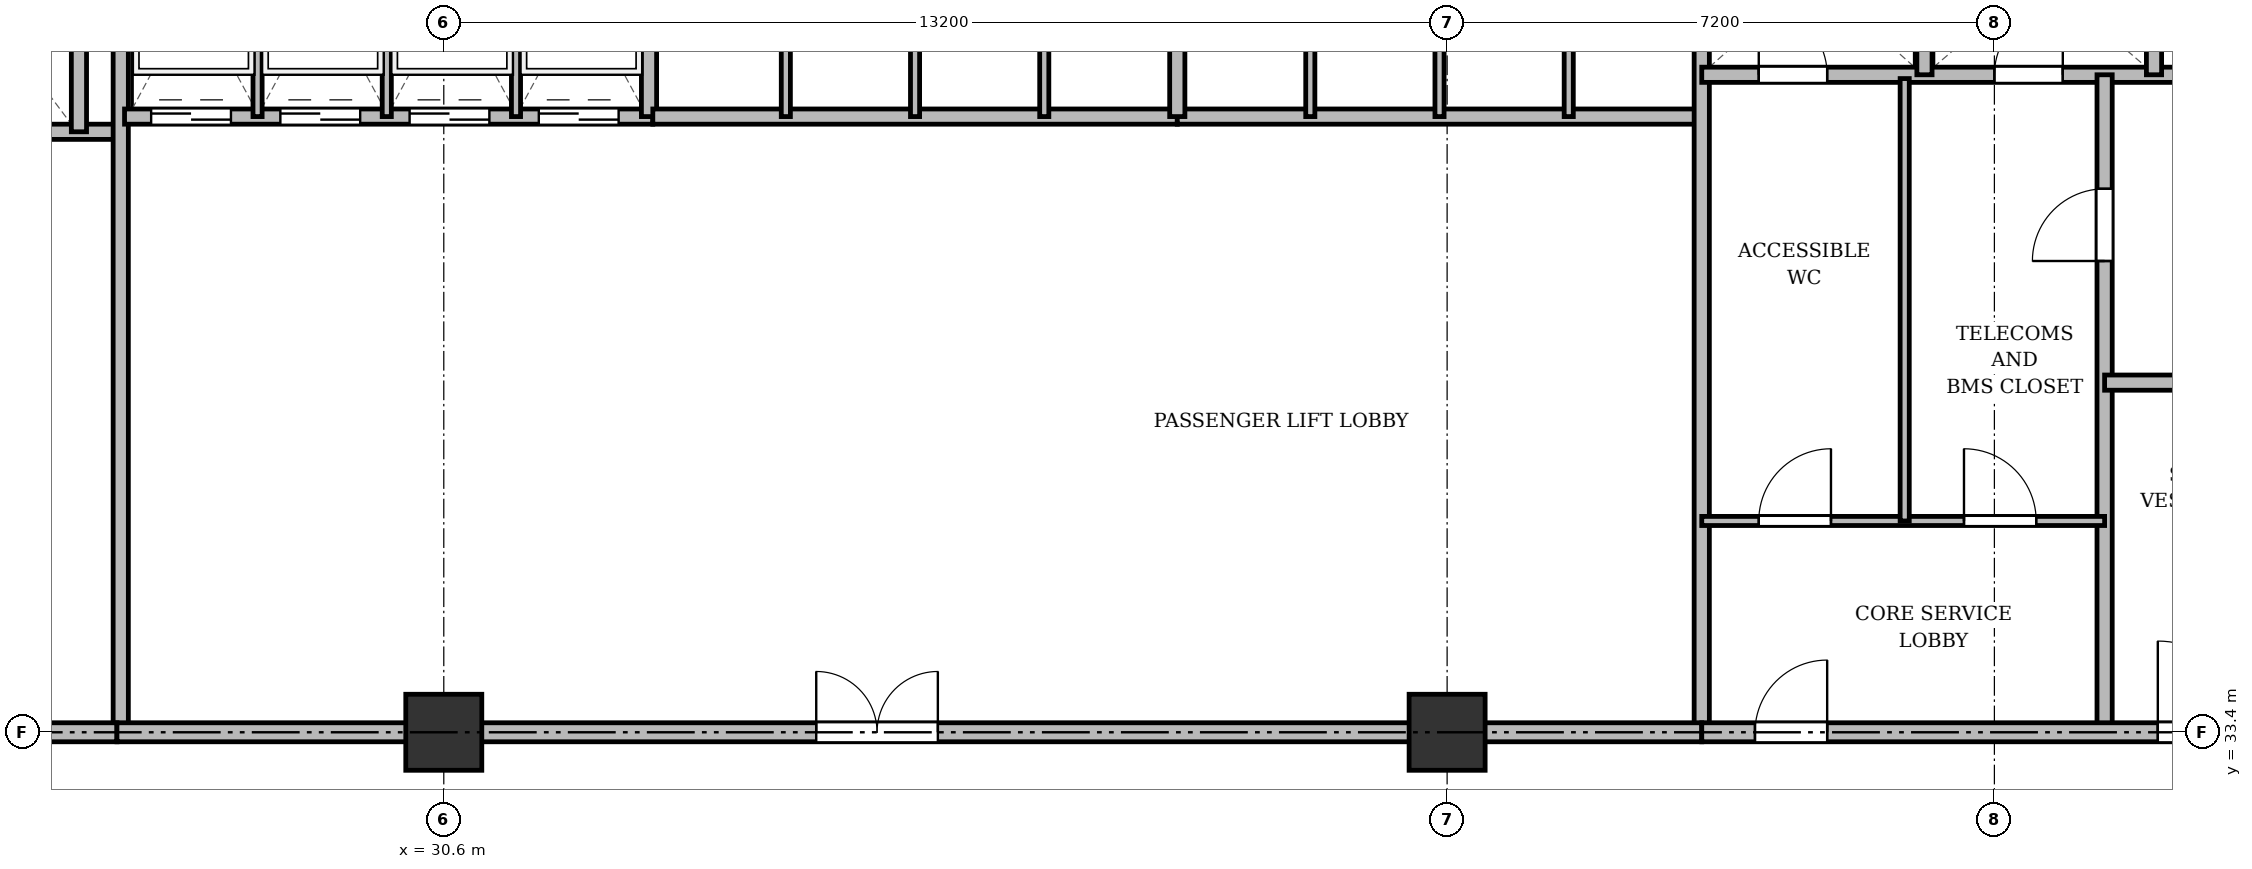
"""IFC4 building model, lengths in metres.
Left out: names, types, materials, properties, quantities, classifications, styles, units other than length and angle.
Written with IfcOpenShell. Run it as: python <this file> out.ifc"""

import sys

from ifc_helpers import new_model, si_unit, direction, frame, frame_2d, origin, origin_2d, place, context, subcontext, project, spatial, rectangle, extrude, source, transform, mapped, element, fill, save


model = new_model("IFC4")
c1 = context("Model", 3, precision=1e-05, world=origin(), true_north=direction((0.0, 1.0)))
c2 = subcontext(c1, "Body", "Model", "MODEL_VIEW")
j1 = project(units=[si_unit("LENGTHUNIT", "METRE"), si_unit("PLANEANGLEUNIT", "RADIAN")], contexts=[c1])
p1 = place(None, origin())
s1 = spatial("IfcSite", under=j1, at=p1, CompositionType="ELEMENT")
p2 = place(p1, origin())
s2 = spatial("IfcBuilding", under=s1, at=p2, CompositionType="ELEMENT")
p3 = place(p2, frame((0.0, 0.0, 14.2)))
s3 = spatial("IfcBuildingStorey", under=s2, at=p3, CompositionType="ELEMENT", Elevation=14.2)
m1 = source(origin(), c2, "Body", "SweptSolid", [
    extrude(rectangle(XDim=1.0, YDim=1.0, at=origin_2d()), origin(), (0.0, 0.0, 1.0), 4.5),
])
for number, where, z_axis, x_axis in (
    (1, (30.6, 33.4, 0.0), (0.0, 0.0, 1.0), (1.0, 0.0, 0.0)),
    (2, (43.8, 33.4, 0.0), (0.0, 0.0, 1.0), (1.0, 0.0, 0.0)),
):
    element("IfcColumn", number, at=place(p3, frame(where, z_axis=z_axis, x_axis=x_axis)), inside=s3, PredefinedType="COLUMN", context=c2, shape_type="MappedRepresentation", body=[
        mapped(m1, transform((0.0, 0.0, 0.0), x_axis=(1.0, 0.0, 0.0), y_axis=(0.0, 1.0, 0.0), z_axis=(0.0, 0.0, 1.0), scale=1.0)),
    ])
p4 = place(p3, frame((19.55, 41.3, 0.0), z_axis=(0.0, 0.0, 1.0), x_axis=(1.0, 0.0, 0.0)))
e3 = element("IfcWall", 3, at=p4, inside=s3, PredefinedType="SOLIDWALL", context=c2, shape_type="SweptSolid", body=[
    extrude(rectangle(XDim=6.75, YDim=0.2, at=frame_2d((3.375, 0.0))), origin(), (0.0, 0.0, 1.0), 4.15),
])
p5 = place(p4, frame((1.7, 0.0, 0.0)))
e4 = element("IfcOpeningElement", 4, at=p5, cuts=e3, PredefinedType="OPENING", context=c2, shape_type="SweptSolid", body=[
    extrude(rectangle(XDim=1.1, YDim=2.15, at=frame_2d((0.55, 1.075))), frame((0.0, 0.11, 0.0), z_axis=(0.0, -1.0, 0.0), x_axis=(1.0, 0.0, 0.0)), (0.0, 0.0, 1.0), 0.22),
])
p6 = place(p4, frame((4.4, 0.0, 0.0)))
e5 = element("IfcOpeningElement", 5, at=p6, cuts=e3, PredefinedType="OPENING", context=c2, shape_type="SweptSolid", body=[
    extrude(rectangle(XDim=1.1, YDim=2.15, at=frame_2d((0.55, 1.075))), frame((0.0, 0.11, 0.0), z_axis=(0.0, -1.0, 0.0), x_axis=(1.0, 0.0, 0.0)), (0.0, 0.0, 1.0), 0.22),
])
p7 = place(p3, frame((25.8, 41.3, 0.0), z_axis=(0.0, 0.0, 1.0), x_axis=(0.0, 1.0, 0.0)))
e6 = element("IfcWall", 6, at=p7, inside=s3, PredefinedType="SOLIDWALL", context=c2, shape_type="SweptSolid", body=[
    extrude(rectangle(XDim=3.4, YDim=0.2, at=frame_2d((1.7, 0.0))), origin(), (0.0, 0.0, 1.0), 4.15),
])
p8 = place(p3, frame((26.35, 33.4, 0.0), z_axis=(0.0, 0.0, 1.0), x_axis=(0.0, 1.0, 0.0)))
e7 = element("IfcWall", 7, at=p8, inside=s3, PredefinedType="SOLIDWALL", context=c2, shape_type="SweptSolid", body=[
    extrude(rectangle(XDim=11.3, YDim=0.2, at=frame_2d((5.65, 0.0))), origin(), (0.0, 0.0, 1.0), 3.05),
])
p9 = place(p3, frame((19.5, 33.4, 0.0), z_axis=(0.0, 0.0, 1.0), x_axis=(1.0, 0.0, 0.0)))
e8 = element("IfcWall", 8, at=p9, inside=s3, PredefinedType="PARTITIONING", context=c2, shape_type="SweptSolid", body=[
    extrude(rectangle(XDim=6.8, YDim=0.25, at=frame_2d((3.4, 0.0))), origin(), (0.0, 0.0, 1.0), 3.05),
])
p10 = place(p9, frame((0.75, 0.0, 0.0)))
e9 = element("IfcOpeningElement", 9, at=p10, cuts=e8, PredefinedType="OPENING", context=c2, shape_type="SweptSolid", body=[
    extrude(rectangle(XDim=1.6, YDim=2.2, at=frame_2d((0.8, 1.1))), frame((0.0, 0.135, 0.0), z_axis=(0.0, -1.0, 0.0), x_axis=(1.0, 0.0, 0.0)), (0.0, 0.0, 1.0), 0.27),
])
p11 = place(p3, frame((26.4, 41.5, 0.0), z_axis=(0.0, 0.0, 1.0), x_axis=(1.0, 0.0, 0.0)))
e10 = element("IfcWall", 10, at=p11, inside=s3, PredefinedType="SOLIDWALL", context=c2, shape_type="SweptSolid", body=[
    extrude(rectangle(XDim=6.95, YDim=0.2, at=frame_2d((3.475, 0.0))), origin(), (0.0, 0.0, 1.0), 4.15),
])
p12 = place(p11, frame((0.35, 0.0, 0.0)))
e11 = element("IfcOpeningElement", 11, at=p12, cuts=e10, PredefinedType="OPENING", context=c2, shape_type="SweptSolid", body=[
    extrude(rectangle(XDim=1.05, YDim=2.15, at=frame_2d((0.525, 1.075))), frame((0.0, 0.11, 0.0), z_axis=(0.0, -1.0, 0.0), x_axis=(1.0, 0.0, 0.0)), (0.0, 0.0, 1.0), 0.22),
])
p13 = place(p11, frame((2.05, 0.0, 0.0)))
e12 = element("IfcOpeningElement", 12, at=p13, cuts=e10, PredefinedType="OPENING", context=c2, shape_type="SweptSolid", body=[
    extrude(rectangle(XDim=1.05, YDim=2.15, at=frame_2d((0.525, 1.075))), frame((0.0, 0.11, 0.0), z_axis=(0.0, -1.0, 0.0), x_axis=(1.0, 0.0, 0.0)), (0.0, 0.0, 1.0), 0.22),
])
p14 = place(p11, frame((3.75, 0.0, 0.0)))
e13 = element("IfcOpeningElement", 13, at=p14, cuts=e10, PredefinedType="OPENING", context=c2, shape_type="SweptSolid", body=[
    extrude(rectangle(XDim=1.05, YDim=2.15, at=frame_2d((0.525, 1.075))), frame((0.0, 0.11, 0.0), z_axis=(0.0, -1.0, 0.0), x_axis=(1.0, 0.0, 0.0)), (0.0, 0.0, 1.0), 0.22),
])
p15 = place(p11, frame((5.45, 0.0, 0.0)))
e14 = element("IfcOpeningElement", 14, at=p15, cuts=e10, PredefinedType="OPENING", context=c2, shape_type="SweptSolid", body=[
    extrude(rectangle(XDim=1.05, YDim=2.15, at=frame_2d((0.525, 1.075))), frame((0.0, 0.11, 0.0), z_axis=(0.0, -1.0, 0.0), x_axis=(1.0, 0.0, 0.0)), (0.0, 0.0, 1.0), 0.22),
])
p16 = place(p3, frame((33.3, 41.5, 0.0), z_axis=(0.0, 0.0, 1.0), x_axis=(0.0, 1.0, 0.0)))
e15 = element("IfcWall", 15, at=p16, inside=s3, PredefinedType="SOLIDWALL", context=c2, shape_type="SweptSolid", body=[
    extrude(rectangle(XDim=3.2, YDim=0.2, at=frame_2d((1.6, 0.0))), origin(), (0.0, 0.0, 1.0), 4.15),
])
for number, where, z_axis, x_axis in (
    (16, (28.15, 41.5, 0.0), (0.0, 0.0, 1.0), (0.0, 1.0, 0.0)),
    (17, (29.85, 41.5, 0.0), (0.0, 0.0, 1.0), (0.0, 1.0, 0.0)),
    (18, (31.55, 41.5, 0.0), (0.0, 0.0, 1.0), (0.0, 1.0, 0.0)),
):
    element("IfcWall", number, at=place(p3, frame(where, z_axis=z_axis, x_axis=x_axis)), inside=s3, PredefinedType="PARTITIONING", context=c2, shape_type="SweptSolid", body=[
        extrude(rectangle(XDim=3.2, YDim=0.12, at=frame_2d((1.6, 0.0))), origin(), (0.0, 0.0, 1.0), 4.15),
    ])
p17 = place(p3, frame((33.35, 41.5, 0.0), z_axis=(0.0, 0.0, 1.0), x_axis=(1.0, 0.0, 0.0)))
e19 = element("IfcWall", 19, at=p17, inside=s3, PredefinedType="SOLIDWALL", context=c2, shape_type="SweptSolid", body=[
    extrude(rectangle(XDim=6.9, YDim=0.2, at=frame_2d((3.45, 0.0))), origin(), (0.0, 0.0, 1.0), 4.15),
])
for number, where, z_axis, x_axis in (
    (20, (35.1, 41.5, 0.0), (0.0, 0.0, 1.0), (0.0, 1.0, 0.0)),
    (21, (36.8, 41.5, 0.0), (0.0, 0.0, 1.0), (0.0, 1.0, 0.0)),
    (22, (38.5, 41.5, 0.0), (0.0, 0.0, 1.0), (0.0, 1.0, 0.0)),
):
    element("IfcWall", number, at=place(p3, frame(where, z_axis=z_axis, x_axis=x_axis)), inside=s3, PredefinedType="PARTITIONING", context=c2, shape_type="SweptSolid", body=[
        extrude(rectangle(XDim=3.2, YDim=0.12, at=frame_2d((1.6, 0.0))), origin(), (0.0, 0.0, 1.0), 4.15),
    ])
p18 = place(p3, frame((40.25, 41.5, 0.0), z_axis=(0.0, 0.0, 1.0), x_axis=(1.0, 0.0, 0.0)))
e23 = element("IfcWall", 23, at=p18, inside=s3, PredefinedType="SOLIDWALL", context=c2, shape_type="SweptSolid", body=[
    extrude(rectangle(XDim=6.9, YDim=0.2, at=frame_2d((3.45, 0.0))), origin(), (0.0, 0.0, 1.0), 3.35),
])
p19 = place(p3, frame((40.25, 41.5, 0.0), z_axis=(0.0, 0.0, 1.0), x_axis=(0.0, 1.0, 0.0)))
e24 = element("IfcWall", 24, at=p19, inside=s3, PredefinedType="SOLIDWALL", context=c2, shape_type="SweptSolid", body=[
    extrude(rectangle(XDim=3.2, YDim=0.2, at=frame_2d((1.6, 0.0))), origin(), (0.0, 0.0, 1.0), 4.15),
])
p20 = place(p3, frame((42.0, 41.5, 0.0), z_axis=(0.0, 0.0, 1.0), x_axis=(0.0, 1.0, 0.0)))
e25 = element("IfcWall", 25, at=p20, inside=s3, PredefinedType="PARTITIONING", context=c2, shape_type="SweptSolid", body=[
    extrude(rectangle(XDim=3.2, YDim=0.12, at=frame_2d((1.6, 0.0))), origin(), (0.0, 0.0, 1.0), 4.15),
])
p21 = place(p3, frame((43.7, 41.5, 0.0), z_axis=(0.0, 0.0, 1.0), x_axis=(0.0, 1.0, 0.0)))
e26 = element("IfcWall", 26, at=p21, inside=s3, PredefinedType="PARTITIONING", context=c2, shape_type="SweptSolid", body=[
    extrude(rectangle(XDim=3.2, YDim=0.12, at=frame_2d((1.6, 0.0))), origin(), (0.0, 0.0, 1.0), 3.35),
])
p22 = place(p3, frame((45.4, 41.5, 0.0), z_axis=(0.0, 0.0, 1.0), x_axis=(0.0, 1.0, 0.0)))
e27 = element("IfcWall", 27, at=p22, inside=s3, PredefinedType="PARTITIONING", context=c2, shape_type="SweptSolid", body=[
    extrude(rectangle(XDim=3.2, YDim=0.12, at=frame_2d((1.6, 0.0))), origin(), (0.0, 0.0, 1.0), 4.15),
])
p23 = place(p3, frame((47.15, 33.4, 0.0), z_axis=(0.0, 0.0, 1.0), x_axis=(0.0, 1.0, 0.0)))
e28 = element("IfcWall", 28, at=p23, inside=s3, PredefinedType="SOLIDWALL", context=c2, shape_type="SweptSolid", body=[
    extrude(rectangle(XDim=11.3, YDim=0.2, at=frame_2d((5.65, 0.0))), origin(), (0.0, 0.0, 1.0), 3.05),
])
p24 = place(p3, frame((26.3, 33.4, 0.0), z_axis=(0.0, 0.0, 1.0), x_axis=(1.0, 0.0, 0.0)))
e29 = element("IfcWall", 29, at=p24, inside=s3, PredefinedType="PARTITIONING", context=c2, shape_type="SweptSolid", body=[
    extrude(rectangle(XDim=20.85, YDim=0.25, at=frame_2d((10.425, 0.0))), origin(), (0.0, 0.0, 1.0), 3.05),
])
p25 = place(p24, frame((9.2, 0.0, 0.0)))
e30 = element("IfcOpeningElement", 30, at=p25, cuts=e29, PredefinedType="OPENING", context=c2, shape_type="SweptSolid", body=[
    extrude(rectangle(XDim=1.6, YDim=2.2, at=frame_2d((0.8, 1.1))), frame((0.0, 0.135, 0.0), z_axis=(0.0, -1.0, 0.0), x_axis=(1.0, 0.0, 0.0)), (0.0, 0.0, 1.0), 0.27),
])
p26 = place(p3, frame((47.15, 42.05, 0.0), z_axis=(0.0, 0.0, 1.0), x_axis=(1.0, 0.0, 0.0)))
e31 = element("IfcWall", 31, at=p26, inside=s3, PredefinedType="SOLIDWALL", context=c2, shape_type="SweptSolid", body=[
    extrude(rectangle(XDim=7.85, YDim=0.2, at=frame_2d((3.925, 0.0))), origin(), (0.0, 0.0, 1.0), 4.15),
])
p27 = place(p26, frame((0.75, 0.0, 0.0)))
e32 = element("IfcOpeningElement", 32, at=p27, cuts=e31, PredefinedType="OPENING", context=c2, shape_type="SweptSolid", body=[
    extrude(rectangle(XDim=0.9, YDim=2.1, at=frame_2d((0.45, 1.05))), frame((0.0, 0.11, 0.0), z_axis=(0.0, -1.0, 0.0), x_axis=(1.0, 0.0, 0.0)), (0.0, 0.0, 1.0), 0.22),
])
p28 = place(p26, frame((3.85, 0.0, 0.0)))
e33 = element("IfcOpeningElement", 33, at=p28, cuts=e31, PredefinedType="OPENING", context=c2, shape_type="SweptSolid", body=[
    extrude(rectangle(XDim=0.9, YDim=2.1, at=frame_2d((0.45, 1.05))), frame((0.0, 0.11, 0.0), z_axis=(0.0, -1.0, 0.0), x_axis=(1.0, 0.0, 0.0)), (0.0, 0.0, 1.0), 0.22),
])
for number, where, z_axis, x_axis in (
    (34, (50.08, 42.05, 0.0), (0.0, 0.0, 1.0), (0.0, 1.0, 0.0)),
    (35, (53.1, 42.05, 0.0), (0.0, 0.0, 1.0), (0.0, 1.0, 0.0)),
):
    element("IfcWall", number, at=place(p3, frame(where, z_axis=z_axis, x_axis=x_axis)), inside=s3, PredefinedType="SOLIDWALL", context=c2, shape_type="SweptSolid", body=[
        extrude(rectangle(XDim=2.65, YDim=0.2, at=frame_2d((1.325, 0.0))), origin(), (0.0, 0.0, 1.0), 4.15),
    ])
p29 = place(p3, frame((52.45, 33.4, 0.0), z_axis=(0.0, 0.0, 1.0), x_axis=(0.0, 1.0, 0.0)))
e36 = element("IfcWall", 36, at=p29, inside=s3, PredefinedType="PARTITIONING", context=c2, shape_type="SweptSolid", body=[
    extrude(rectangle(XDim=8.65, YDim=0.2, at=frame_2d((4.325, 0.0))), origin(), (0.0, 0.0, 1.0), 3.05),
])
p30 = place(p29, frame((6.2, 0.0, 0.0)))
e37 = element("IfcOpeningElement", 37, at=p30, cuts=e36, PredefinedType="OPENING", context=c2, shape_type="SweptSolid", body=[
    extrude(rectangle(XDim=0.95, YDim=2.15, at=frame_2d((0.475, 1.075))), frame((0.0, 0.11, 0.0), z_axis=(0.0, -1.0, 0.0), x_axis=(1.0, 0.0, 0.0)), (0.0, 0.0, 1.0), 0.22),
])
p31 = place(p3, frame((52.45, 38.0, 0.0), z_axis=(0.0, 0.0, 1.0), x_axis=(1.0, 0.0, 0.0)))
e38 = element("IfcWall", 38, at=p31, inside=s3, PredefinedType="PARTITIONING", context=c2, shape_type="SweptSolid", body=[
    extrude(rectangle(XDim=2.55, YDim=0.2, at=frame_2d((1.275, 0.0))), origin(), (0.0, 0.0, 1.0), 4.15),
])
p32 = place(p3, frame((47.15, 36.18, 0.0), z_axis=(0.0, 0.0, 1.0), x_axis=(1.0, 0.0, 0.0)))
e39 = element("IfcWall", 39, at=p32, inside=s3, PredefinedType="PARTITIONING", context=c2, shape_type="SweptSolid", body=[
    extrude(rectangle(XDim=5.3, YDim=0.12, at=frame_2d((2.65, 0.0))), origin(), (0.0, 0.0, 1.0), 4.15),
])
p33 = place(p32, frame((0.75, 0.0, 0.0)))
e40 = element("IfcOpeningElement", 40, at=p33, cuts=e39, PredefinedType="OPENING", context=c2, shape_type="SweptSolid", body=[
    extrude(rectangle(XDim=0.95, YDim=2.15, at=frame_2d((0.475, 1.075))), frame((0.0, 0.07, 0.0), z_axis=(0.0, -1.0, 0.0), x_axis=(1.0, 0.0, 0.0)), (0.0, 0.0, 1.0), 0.14),
])
p34 = place(p32, frame((3.45, 0.0, 0.0)))
e41 = element("IfcOpeningElement", 41, at=p34, cuts=e39, PredefinedType="OPENING", context=c2, shape_type="SweptSolid", body=[
    extrude(rectangle(XDim=0.95, YDim=2.15, at=frame_2d((0.475, 1.075))), frame((0.0, 0.07, 0.0), z_axis=(0.0, -1.0, 0.0), x_axis=(1.0, 0.0, 0.0)), (0.0, 0.0, 1.0), 0.14),
])
p35 = place(p3, frame((49.82, 36.18, 0.0), z_axis=(0.0, 0.0, 1.0), x_axis=(0.0, 1.0, 0.0)))
e42 = element("IfcWall", 42, at=p35, inside=s3, PredefinedType="PARTITIONING", context=c2, shape_type="SweptSolid", body=[
    extrude(rectangle(XDim=5.82, YDim=0.12, at=frame_2d((2.91, 0.0))), origin(), (0.0, 0.0, 1.0), 4.15),
])
p36 = place(p3, frame((47.15, 33.4, 0.0), z_axis=(0.0, 0.0, 1.0), x_axis=(1.0, 0.0, 0.0)))
e43 = element("IfcWall", 43, at=p36, inside=s3, PredefinedType="PARTITIONING", context=c2, shape_type="SweptSolid", body=[
    extrude(rectangle(XDim=11.15, YDim=0.25, at=frame_2d((5.575, 0.0))), origin(), (0.0, 0.0, 1.0), 3.05),
])
p37 = place(p36, frame((0.7, 0.0, 0.0)))
e44 = element("IfcOpeningElement", 44, at=p37, cuts=e43, PredefinedType="OPENING", context=c2, shape_type="SweptSolid", body=[
    extrude(rectangle(XDim=0.95, YDim=2.15, at=frame_2d((0.475, 1.075))), frame((0.0, 0.135, 0.0), z_axis=(0.0, -1.0, 0.0), x_axis=(1.0, 0.0, 0.0)), (0.0, 0.0, 1.0), 0.27),
])
p38 = place(p36, frame((6.0, 0.0, 0.0)))
e45 = element("IfcOpeningElement", 45, at=p38, cuts=e43, PredefinedType="OPENING", context=c2, shape_type="SweptSolid", body=[
    extrude(rectangle(XDim=1.2, YDim=2.15, at=frame_2d((0.6, 1.075))), frame((0.0, 0.135, 0.0), z_axis=(0.0, -1.0, 0.0), x_axis=(1.0, 0.0, 0.0)), (0.0, 0.0, 1.0), 0.27),
])
m2 = source(origin(), c2, "Body", "SweptSolid", [
    extrude(rectangle(XDim=1.05, YDim=2.15, at=frame_2d((0.525, 1.075))), frame((0.0, 0.025, 0.0), z_axis=(0.0, -1.0, 0.0), x_axis=(1.0, 0.0, 0.0)), (0.0, 0.0, 1.0), 0.05),
])
p39 = place(p12, origin())
e46 = element("IfcDoor", 46, at=p39, inside=s3, OperationType="DOUBLE_DOOR_SLIDING", PredefinedType="DOOR", context=c2, shape_type="MappedRepresentation", body=[
    mapped(m2, transform((0.0, 0.0, 0.0), x_axis=(1.0, 0.0, 0.0), y_axis=(0.0, 1.0, 0.0), z_axis=(0.0, 0.0, 1.0), scale=1.0)),
])
fill(e11, e46)
p40 = place(p13, origin())
e47 = element("IfcDoor", 47, at=p40, inside=s3, OperationType="DOUBLE_DOOR_SLIDING", PredefinedType="DOOR", context=c2, shape_type="MappedRepresentation", body=[
    mapped(m2, transform((0.0, 0.0, 0.0), x_axis=(1.0, 0.0, 0.0), y_axis=(0.0, 1.0, 0.0), z_axis=(0.0, 0.0, 1.0), scale=1.0)),
])
fill(e12, e47)
p41 = place(p14, origin())
e48 = element("IfcDoor", 48, at=p41, inside=s3, OperationType="DOUBLE_DOOR_SLIDING", PredefinedType="DOOR", context=c2, shape_type="MappedRepresentation", body=[
    mapped(m2, transform((0.0, 0.0, 0.0), x_axis=(1.0, 0.0, 0.0), y_axis=(0.0, 1.0, 0.0), z_axis=(0.0, 0.0, 1.0), scale=1.0)),
])
fill(e13, e48)
p42 = place(p15, origin())
e49 = element("IfcDoor", 49, at=p42, inside=s3, OperationType="DOUBLE_DOOR_SLIDING", PredefinedType="DOOR", context=c2, shape_type="MappedRepresentation", body=[
    mapped(m2, transform((0.0, 0.0, 0.0), x_axis=(1.0, 0.0, 0.0), y_axis=(0.0, 1.0, 0.0), z_axis=(0.0, 0.0, 1.0), scale=1.0)),
])
fill(e14, e49)
m3 = source(origin(), c2, "Body", "SweptSolid", [
    extrude(rectangle(XDim=1.6, YDim=2.2, at=frame_2d((0.8, 1.1))), frame((0.0, 0.025, 0.0), z_axis=(0.0, -1.0, 0.0), x_axis=(1.0, 0.0, 0.0)), (0.0, 0.0, 1.0), 0.05),
])
p43 = place(p25, origin())
e50 = element("IfcDoor", 50, at=p43, inside=s3, OperationType="DOUBLE_DOOR_SINGLE_SWING", PredefinedType="DOOR", context=c2, shape_type="MappedRepresentation", body=[
    mapped(m3, transform((0.0, 0.0, 0.0), x_axis=(1.0, 0.0, 0.0), y_axis=(0.0, 1.0, 0.0), z_axis=(0.0, 0.0, 1.0), scale=1.0)),
])
fill(e30, e50)
m4 = source(origin(), c2, "Body", "SweptSolid", [
    extrude(rectangle(XDim=0.9, YDim=2.1, at=frame_2d((0.45, 1.05))), frame((0.0, 0.025, 0.0), z_axis=(0.0, -1.0, 0.0), x_axis=(1.0, 0.0, 0.0)), (0.0, 0.0, 1.0), 0.05),
])
p44 = place(p27, origin())
e51 = element("IfcDoor", 51, at=p44, inside=s3, OperationType="SINGLE_SWING_LEFT", PredefinedType="DOOR", context=c2, shape_type="MappedRepresentation", body=[
    mapped(m4, transform((0.0, 0.0, 0.0), x_axis=(1.0, 0.0, 0.0), y_axis=(0.0, 1.0, 0.0), z_axis=(0.0, 0.0, 1.0), scale=1.0)),
])
fill(e32, e51)
p45 = place(p28, origin())
e52 = element("IfcDoor", 52, at=p45, inside=s3, OperationType="SINGLE_SWING_RIGHT", PredefinedType="DOOR", context=c2, shape_type="MappedRepresentation", body=[
    mapped(m4, transform((0.0, 0.0, 0.0), x_axis=(1.0, 0.0, 0.0), y_axis=(0.0, 1.0, 0.0), z_axis=(0.0, 0.0, 1.0), scale=1.0)),
])
fill(e33, e52)
m5 = source(origin(), c2, "Body", "SweptSolid", [
    extrude(rectangle(XDim=0.95, YDim=2.15, at=frame_2d((0.475, 1.075))), frame((0.0, 0.025, 0.0), z_axis=(0.0, -1.0, 0.0), x_axis=(1.0, 0.0, 0.0)), (0.0, 0.0, 1.0), 0.05),
])
p46 = place(p30, origin())
e53 = element("IfcDoor", 53, at=p46, inside=s3, OperationType="SINGLE_SWING_LEFT", PredefinedType="DOOR", context=c2, shape_type="MappedRepresentation", body=[
    mapped(m5, transform((0.0, 0.0, 0.0), x_axis=(1.0, 0.0, 0.0), y_axis=(0.0, 1.0, 0.0), z_axis=(0.0, 0.0, 1.0), scale=1.0)),
])
fill(e37, e53)
p47 = place(p33, origin())
e54 = element("IfcDoor", 54, at=p47, inside=s3, OperationType="SINGLE_SWING_RIGHT", PredefinedType="DOOR", context=c2, shape_type="MappedRepresentation", body=[
    mapped(m5, transform((0.0, 0.0, 0.0), x_axis=(1.0, 0.0, 0.0), y_axis=(0.0, 1.0, 0.0), z_axis=(0.0, 0.0, 1.0), scale=1.0)),
])
fill(e40, e54)
p48 = place(p34, origin())
e55 = element("IfcDoor", 55, at=p48, inside=s3, OperationType="SINGLE_SWING_LEFT", PredefinedType="DOOR", context=c2, shape_type="MappedRepresentation", body=[
    mapped(m5, transform((0.0, 0.0, 0.0), x_axis=(1.0, 0.0, 0.0), y_axis=(0.0, 1.0, 0.0), z_axis=(0.0, 0.0, 1.0), scale=1.0)),
])
fill(e41, e55)
p49 = place(p37, origin())
e56 = element("IfcDoor", 56, at=p49, inside=s3, OperationType="SINGLE_SWING_RIGHT", PredefinedType="DOOR", context=c2, shape_type="MappedRepresentation", body=[
    mapped(m5, transform((0.0, 0.0, 0.0), x_axis=(1.0, 0.0, 0.0), y_axis=(0.0, 1.0, 0.0), z_axis=(0.0, 0.0, 1.0), scale=1.0)),
])
fill(e44, e56)
m6 = source(origin(), c2, "Body", "SweptSolid", [
    extrude(rectangle(XDim=1.2, YDim=2.15, at=frame_2d((0.6, 1.075))), frame((0.0, 0.025, 0.0), z_axis=(0.0, -1.0, 0.0), x_axis=(1.0, 0.0, 0.0)), (0.0, 0.0, 1.0), 0.05),
])
p50 = place(p38, origin())
e57 = element("IfcDoor", 57, at=p50, inside=s3, OperationType="SINGLE_SWING_LEFT", PredefinedType="DOOR", context=c2, shape_type="MappedRepresentation", body=[
    mapped(m6, transform((0.0, 0.0, 0.0), x_axis=(1.0, 0.0, 0.0), y_axis=(0.0, 1.0, 0.0), z_axis=(0.0, 0.0, 1.0), scale=1.0)),
])
fill(e45, e57)
save(model, sys.argv[1])
